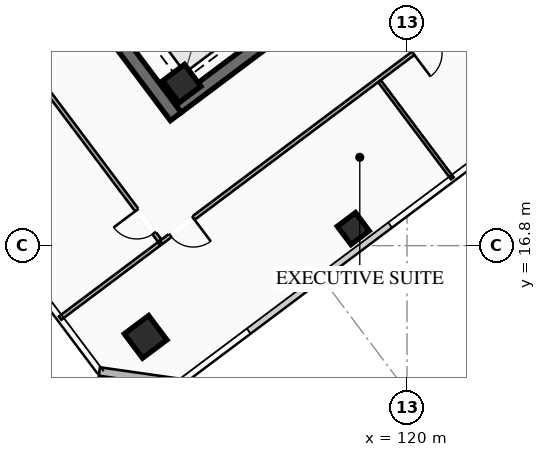
"""IFC4 building model, lengths in metres.
Left out: names, types, materials, properties, quantities, classifications, styles, units other than length and angle.
Written with IfcOpenShell. Run it as: python <this file> out.ifc"""

import sys

from ifc_helpers import new_model, si_unit, direction, frame, frame_2d, origin, origin_2d, place, context, subcontext, project, spatial, rectangle, hollow_rectangle, extrude, element, fill, save


model = new_model("IFC4")
c1 = context("Model", 3, precision=1e-05, world=origin(), true_north=direction((0.0, 1.0)))
c2 = subcontext(c1, "Body", "Model", "MODEL_VIEW")
j1 = project(units=[si_unit("LENGTHUNIT", "METRE"), si_unit("PLANEANGLEUNIT", "RADIAN")], contexts=[c1])
p1 = place(None, origin())
s1 = spatial("IfcSite", under=j1, at=p1, CompositionType="ELEMENT")
p2 = place(p1, origin())
s2 = spatial("IfcBuilding", under=s1, at=p2, CompositionType="ELEMENT")
p3 = place(p2, frame((0.0, 0.0, 236.15)))
s3 = spatial("IfcBuildingStorey", under=s2, at=p3, CompositionType="ELEMENT", Elevation=236.15)
p4 = place(p3, frame((112.396, 21.047, 0.0), z_axis=(0.0, 0.0, 1.0), x_axis=(-0.600005007985, 0.799996243986, 0.0)))
e1 = element("IfcWall", 1, at=p4, inside=s3, PredefinedType="SHEAR", context=c2, shape_type="SweptSolid", body=[
    extrude(rectangle(XDim=15.6, YDim=0.45, at=frame_2d((7.8, 0.0))), origin(), (0.0, 0.0, 1.0), 3.55),
])
p5 = place(p3, frame((124.649, 30.518, 0.0), z_axis=(0.0, 0.0, 1.0), x_axis=(-0.8, -0.6, 0.0)))
e2 = element("IfcWall", 2, at=p5, inside=s3, PredefinedType="SHEAR", context=c2, shape_type="SweptSolid", body=[
    extrude(rectangle(XDim=15.26, YDim=0.45, at=frame_2d((7.63, 0.0))), origin(), (0.0, 0.0, 1.0), 3.55),
])
p6 = place(p5, frame((9.33, 0.0, 0.0)))
e3 = element("IfcOpeningElement", 3, at=p6, cuts=e2, PredefinedType="OPENING", context=c2, shape_type="SweptSolid", body=[
    extrude(rectangle(XDim=1.25, YDim=2.25, at=frame_2d((0.625, 1.125))), frame((0.0, 0.235, 0.0), z_axis=(0.0, -1.0, 0.0), x_axis=(1.0, 0.0, 0.0)), (0.0, 0.0, 1.0), 0.47),
])
p7 = place(p5, frame((4.28, 0.0, 0.0)))
e4 = element("IfcOpeningElement", 4, at=p7, cuts=e2, PredefinedType="OPENING", context=c2, shape_type="SweptSolid", body=[
    extrude(rectangle(XDim=1.25, YDim=2.25, at=frame_2d((0.625, 1.125))), frame((0.0, 0.235, 0.0), z_axis=(0.0, -1.0, 0.0), x_axis=(1.0, 0.0, 0.0)), (0.0, 0.0, 1.0), 0.47),
])
p8 = place(p3, frame((112.59, 22.13, 0.0), z_axis=(0.0, 0.0, 1.0), x_axis=(0.799999996291, 0.600000004945, 0.0)))
e5 = element("IfcColumn", 5, at=p8, inside=s3, PredefinedType="COLUMN", context=c2, shape_type="SweptSolid", body=[
    extrude(hollow_rectangle(XDim=0.9, YDim=0.9, WallThickness=0.04, at=origin_2d()), origin(), (0.0, 0.0, 1.0), 3.37),
])
p9 = place(p3, frame((111.4, 13.8, 0.0), z_axis=(0.0, 0.0, 1.0), x_axis=(0.799999996291, 0.600000004945, 0.0)))
e6 = element("IfcColumn", 6, at=p9, inside=s3, PredefinedType="COLUMN", context=c2, shape_type="SweptSolid", body=[
    extrude(hollow_rectangle(XDim=1.0, YDim=1.0, WallThickness=0.04, at=origin_2d()), origin(), (0.0, 0.0, 1.0), 3.37),
])
p10 = place(p3, frame((118.23, 17.36, 0.0), z_axis=(0.0, 0.0, 1.0), x_axis=(0.799999996291, 0.600000004945, 0.0)))
e7 = element("IfcColumn", 7, at=p10, inside=s3, PredefinedType="COLUMN", context=c2, shape_type="SweptSolid", body=[
    extrude(hollow_rectangle(XDim=0.75, YDim=0.75, WallThickness=0.032, at=origin_2d()), origin(), (0.0, 0.0, 1.0), 3.37),
])
p11 = place(p3, frame((112.54, 12.28, 0.0), z_axis=(0.0, 0.0, 1.0), x_axis=(-0.989956760759, 0.141370477216, 0.0)))
e8 = element("IfcWall", 8, at=p11, inside=s3, PredefinedType="SOLIDWALL", context=c2, shape_type="SweptSolid", body=[
    extrude(rectangle(XDim=2.687, YDim=0.28, at=frame_2d((1.344, 0.0))), origin(), (0.0, 0.0, 1.0), 3.37),
])
p12 = place(p3, frame((124.012, 25.984, 0.0), z_axis=(0.0, 0.0, 1.0), x_axis=(-0.800003872688, -0.599994836382, 0.0)))
e9 = element("IfcWall", 9, at=p12, inside=s3, PredefinedType="PARTITIONING", context=c2, shape_type="SweptSolid", body=[
    extrude(rectangle(XDim=15.13, YDim=0.135, at=frame_2d((7.565, 0.0))), origin(), (0.0, 0.0, 1.0), 2.723),
])
p13 = place(p12, frame((13.8, 0.0, 0.0)))
e10 = element("IfcOpeningElement", 10, at=p13, cuts=e9, PredefinedType="OPENING", context=c2, shape_type="SweptSolid", body=[
    extrude(rectangle(XDim=0.95, YDim=2.05, at=frame_2d((0.475, 1.025))), frame((0.0, 0.077, 0.0), z_axis=(0.0, -1.0, 0.0), x_axis=(1.0, 0.0, 0.0)), (0.0, 0.0, 1.0), 0.155),
])
p14 = place(p12, frame((3.813, 0.0, 0.0)))
e11 = element("IfcOpeningElement", 11, at=p14, cuts=e9, PredefinedType="OPENING", context=c2, shape_type="SweptSolid", body=[
    extrude(rectangle(XDim=0.95, YDim=2.05, at=frame_2d((0.475, 1.025))), frame((0.0, 0.077, 0.0), z_axis=(0.0, -1.0, 0.0), x_axis=(1.0, 0.0, 0.0)), (0.0, 0.0, 1.0), 0.155),
])
p15 = place(p3, frame((121.488, 19.016, 0.0), z_axis=(0.0, 0.0, 1.0), x_axis=(-0.600009815063, 0.799992638609, 0.0)))
e12 = element("IfcWall", 12, at=p15, inside=s3, PredefinedType="PARTITIONING", context=c2, shape_type="SweptSolid", body=[
    extrude(rectangle(XDim=3.98, YDim=0.11, at=frame_2d((1.99, 0.0))), origin(), (0.0, 0.0, 1.0), 2.723),
])
p16 = place(p3, frame((111.86, 16.97, 0.0), z_axis=(0.0, 0.0, 1.0), x_axis=(-0.60000194242, 0.799998543181, 0.0)))
e13 = element("IfcWall", 13, at=p16, inside=s3, PredefinedType="PARTITIONING", context=c2, shape_type="SweptSolid", body=[
    extrude(rectangle(XDim=20.11, YDim=0.135, at=frame_2d((10.055, 0.0))), origin(), (0.0, 0.0, 1.0), 2.723),
])
p17 = place(p16, frame((0.3, 0.0, 0.0)))
e14 = element("IfcOpeningElement", 14, at=p17, cuts=e13, PredefinedType="OPENING", context=c2, shape_type="SweptSolid", body=[
    extrude(rectangle(XDim=0.95, YDim=2.05, at=frame_2d((0.475, 1.025))), frame((0.0, 0.077, 0.0), z_axis=(0.0, -1.0, 0.0), x_axis=(1.0, 0.0, 0.0)), (0.0, 0.0, 1.0), 0.155),
])
p18 = place(p3, frame((108.588, 14.416, 0.0), z_axis=(0.0, 0.0, 1.0), x_axis=(0.800021594126, 0.599971206752, 0.0)))
e15 = element("IfcWall", 15, at=p18, inside=s3, PredefinedType="PARTITIONING", context=c2, shape_type="SweptSolid", body=[
    extrude(rectangle(XDim=4.07, YDim=0.135, at=frame_2d((2.035, 0.0))), origin(), (0.0, 0.0, 1.0), 2.723),
])
p19 = place(p13, origin())
e16 = element("IfcDoor", 16, at=p19, inside=s3, OperationType="SINGLE_SWING_LEFT", PredefinedType="DOOR", context=c2, shape_type="SweptSolid", body=[
    extrude(rectangle(XDim=0.95, YDim=2.05, at=frame_2d((0.475, 1.025))), frame((0.0, 0.025, 0.0), z_axis=(0.0, -1.0, 0.0), x_axis=(1.0, 0.0, 0.0)), (0.0, 0.0, 1.0), 0.05),
])
fill(e10, e16)
p20 = place(p14, origin())
e17 = element("IfcDoor", 17, at=p20, inside=s3, OperationType="SINGLE_SWING_RIGHT", PredefinedType="DOOR", context=c2, shape_type="SweptSolid", body=[
    extrude(rectangle(XDim=0.95, YDim=2.05, at=frame_2d((0.475, 1.025))), frame((0.0, 0.025, 0.0), z_axis=(0.0, -1.0, 0.0), x_axis=(1.0, 0.0, 0.0)), (0.0, 0.0, 1.0), 0.05),
])
fill(e11, e17)
p21 = place(p17, origin())
e18 = element("IfcDoor", 18, at=p21, inside=s3, OperationType="SINGLE_SWING_RIGHT", PredefinedType="DOOR", context=c2, shape_type="SweptSolid", body=[
    extrude(rectangle(XDim=0.95, YDim=2.05, at=frame_2d((0.475, 1.025))), frame((0.0, 0.025, 0.0), z_axis=(0.0, -1.0, 0.0), x_axis=(1.0, 0.0, 0.0)), (0.0, 0.0, 1.0), 0.05),
])
fill(e14, e18)
save(model, sys.argv[1])
